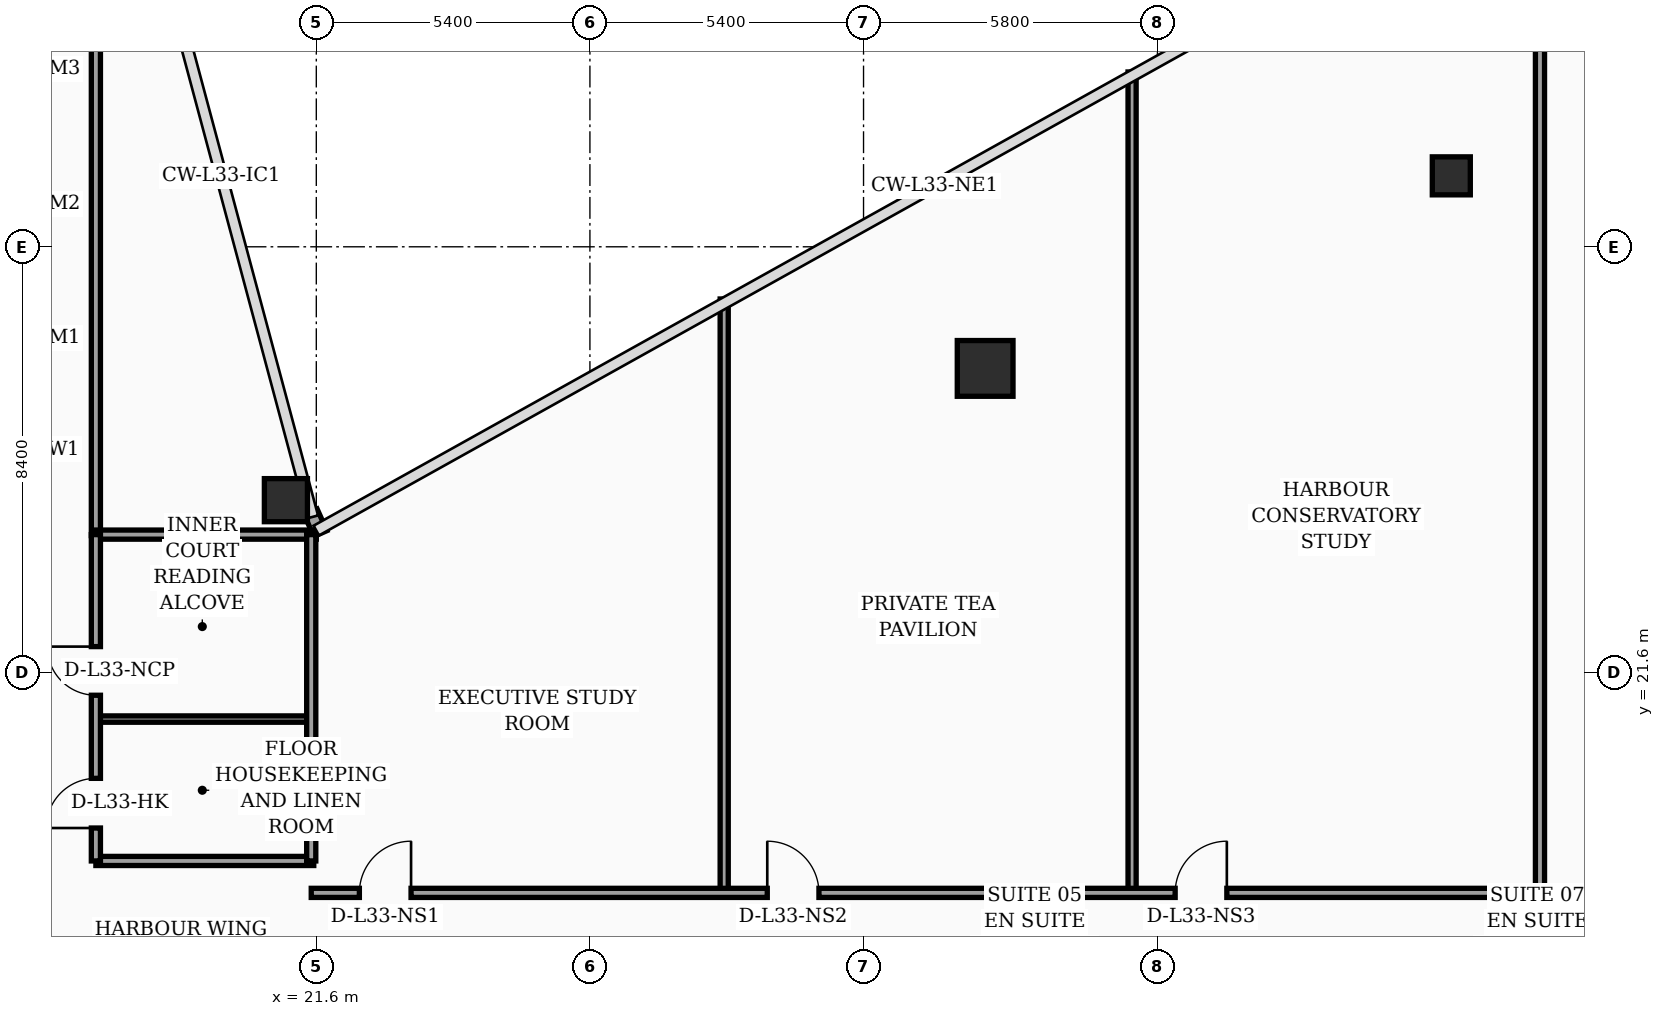
"""IFC4 building model, lengths in metres.
Left out: names, types, materials, properties, quantities, classifications, styles, units other than length and angle.
Written with IfcOpenShell. Run it as: python <this file> out.ifc"""

import sys

from ifc_helpers import new_model, si_unit, direction, frame, frame_2d, origin, origin_2d, place, context, subcontext, project, spatial, rectangle, hollow_rectangle, circle, extrude, element, fill, save


model = new_model("IFC4")
c1 = context("Model", 3, precision=1e-05, world=origin(), true_north=direction((0.0, 1.0)))
c2 = subcontext(c1, "Body", "Model", "MODEL_VIEW")
j1 = project(units=[si_unit("LENGTHUNIT", "METRE"), si_unit("PLANEANGLEUNIT", "RADIAN")], contexts=[c1])
p1 = place(None, origin())
s1 = spatial("IfcSite", under=j1, at=p1, CompositionType="ELEMENT")
p2 = place(p1, origin())
s2 = spatial("IfcBuilding", under=s1, at=p2, CompositionType="ELEMENT")
p3 = place(p2, frame((0.0, 0.0, 135.4)))
s3 = spatial("IfcBuildingStorey", under=s2, at=p3, CompositionType="ELEMENT", Elevation=135.4)
p4 = place(p3, frame((21.0, 25.0, 0.0), z_axis=(0.0, 0.0, 1.0), x_axis=(1.0, 0.0, 0.0)))
e1 = element("IfcColumn", 1, at=p4, inside=s3, PredefinedType="COLUMN", context=c2, shape_type="SweptSolid", body=[
    extrude(hollow_rectangle(XDim=0.85, YDim=0.85, WallThickness=0.036, at=origin_2d()), origin(), (0.0, 0.0, 1.0), 3.52),
])
p5 = place(p3, frame((34.8, 27.6, 0.0), z_axis=(0.0, 0.0, 1.0), x_axis=(1.0, 0.0, 0.0)))
e2 = element("IfcColumn", 2, at=p5, inside=s3, PredefinedType="COLUMN", context=c2, shape_type="SweptSolid", body=[
    extrude(circle(Radius=0.55, at=origin_2d()), origin(), (0.0, 0.0, 1.0), 3.52),
])
p6 = place(p3, frame((44.0, 31.4, 0.0), z_axis=(0.0, 0.0, 1.0), x_axis=(1.0, 0.0, 0.0)))
e3 = element("IfcColumn", 3, at=p6, inside=s3, PredefinedType="COLUMN", context=c2, shape_type="SweptSolid", body=[
    extrude(hollow_rectangle(XDim=0.75, YDim=0.75, WallThickness=0.032, at=origin_2d()), origin(), (0.0, 0.0, 1.0), 3.52),
])
p7 = place(p3, frame((21.68, 24.34, 0.0), z_axis=(0.0, 0.0, 1.0), x_axis=(-0.40758134973, 0.913168901875, 0.0)))
e4 = element("IfcWall", 4, at=p7, inside=s3, PredefinedType="SOLIDWALL", context=c2, shape_type="SweptSolid", body=[
    extrude(rectangle(XDim=0.471, YDim=0.28, at=frame_2d((0.235, 0.0))), origin(), (0.0, 0.0, 1.0), 3.52),
])
p8 = place(p3, frame((17.25, 24.3, 0.0), z_axis=(0.0, 0.0, 1.0), x_axis=(0.0, 1.0, 0.0)))
e5 = element("IfcWall", 5, at=p8, inside=s3, PredefinedType="PARTITIONING", context=c2, shape_type="SweptSolid", body=[
    extrude(rectangle(XDim=17.65, YDim=0.18, at=frame_2d((8.825, 0.0))), origin(), (0.0, 0.0, 1.0), 2.82),
])
p9 = place(p3, frame((17.25, 17.88, 0.0), z_axis=(0.0, 0.0, 1.0), x_axis=(1.0, 0.0, 0.0)))
e6 = element("IfcWall", 6, at=p9, inside=s3, PredefinedType="PARTITIONING", context=c2, shape_type="SweptSolid", body=[
    extrude(rectangle(XDim=4.3, YDim=0.18, at=frame_2d((2.15, 0.0))), origin(), (0.0, 0.0, 1.0), 3.52),
])
p10 = place(p3, frame((17.25, 20.68, 0.0), z_axis=(0.0, 0.0, 1.0), x_axis=(1.0, 0.0, 0.0)))
e7 = element("IfcWall", 7, at=p10, inside=s3, PredefinedType="PARTITIONING", context=c2, shape_type="SweptSolid", body=[
    extrude(rectangle(XDim=4.3, YDim=0.125, at=frame_2d((2.15, 0.0))), origin(), (0.0, 0.0, 1.0), 3.52),
])
p11 = place(p3, frame((17.25, 24.32, 0.0), z_axis=(0.0, 0.0, 1.0), x_axis=(1.0, 0.0, 0.0)))
e8 = element("IfcWall", 8, at=p11, inside=s3, PredefinedType="PARTITIONING", context=c2, shape_type="SweptSolid", body=[
    extrude(rectangle(XDim=4.35, YDim=0.18, at=frame_2d((2.175, 0.0))), origin(), (0.0, 0.0, 1.0), 3.52),
])
p12 = place(p3, frame((21.5, 17.88, 0.0), z_axis=(0.0, 0.0, 1.0), x_axis=(0.0, 1.0, 0.0)))
e9 = element("IfcWall", 9, at=p12, inside=s3, PredefinedType="PARTITIONING", context=c2, shape_type="SweptSolid", body=[
    extrude(rectangle(XDim=6.44, YDim=0.18, at=frame_2d((3.22, 0.0))), origin(), (0.0, 0.0, 1.0), 3.52),
])
p13 = place(p3, frame((17.25, 17.88, 0.0), z_axis=(0.0, 0.0, 1.0), x_axis=(0.0, 1.0, 0.0)))
e10 = element("IfcWall", 10, at=p13, inside=s3, PredefinedType="PARTITIONING", context=c2, shape_type="SweptSolid", body=[
    extrude(rectangle(XDim=6.44, YDim=0.18, at=frame_2d((3.22, 0.0))), origin(), (0.0, 0.0, 1.0), 3.52),
])
p14 = place(p13, frame((0.65, 0.0, 0.0)))
e11 = element("IfcOpeningElement", 11, at=p14, cuts=e10, PredefinedType="OPENING", context=c2, shape_type="SweptSolid", body=[
    extrude(rectangle(XDim=0.98, YDim=2.15, at=frame_2d((0.49, 1.075))), frame((0.0, 0.1, 0.0), z_axis=(0.0, -1.0, 0.0), x_axis=(1.0, 0.0, 0.0)), (0.0, 0.0, 1.0), 0.2),
])
p15 = place(p13, frame((3.27, 0.0, 0.0)))
e12 = element("IfcOpeningElement", 12, at=p15, cuts=e10, PredefinedType="OPENING", context=c2, shape_type="SweptSolid", body=[
    extrude(rectangle(XDim=0.96, YDim=2.2, at=frame_2d((0.48, 1.1))), frame((0.0, 0.1, 0.0), z_axis=(0.0, -1.0, 0.0), x_axis=(1.0, 0.0, 0.0)), (0.0, 0.0, 1.0), 0.2),
])
p16 = place(p3, frame((29.65, 17.25, 0.0), z_axis=(0.0, 0.0, 1.0), x_axis=(0.0, 1.0, 0.0)))
e13 = element("IfcWall", 13, at=p16, inside=s3, PredefinedType="PARTITIONING", context=c2, shape_type="SweptSolid", body=[
    extrude(rectangle(XDim=11.72, YDim=0.16, at=frame_2d((5.86, 0.0))), origin(), (0.0, 0.0, 1.0), 2.82),
])
p17 = place(p3, frame((37.7, 17.25, 0.0), z_axis=(0.0, 0.0, 1.0), x_axis=(0.0, 1.0, 0.0)))
e14 = element("IfcWall", 14, at=p17, inside=s3, PredefinedType="PARTITIONING", context=c2, shape_type="SweptSolid", body=[
    extrude(rectangle(XDim=16.2, YDim=0.16, at=frame_2d((8.1, 0.0))), origin(), (0.0, 0.0, 1.0), 2.82),
])
p18 = place(p3, frame((21.5, 17.25, 0.0), z_axis=(0.0, 0.0, 1.0), x_axis=(1.0, 0.0, 0.0)))
e15 = element("IfcWall", 15, at=p18, inside=s3, PredefinedType="PARTITIONING", context=c2, shape_type="SweptSolid", body=[
    extrude(rectangle(XDim=24.25, YDim=0.18, at=frame_2d((12.125, 0.0))), origin(), (0.0, 0.0, 1.0), 2.82),
])
p19 = place(p18, frame((0.95, 0.0, 0.0)))
e16 = element("IfcOpeningElement", 16, at=p19, cuts=e15, PredefinedType="OPENING", context=c2, shape_type="SweptSolid", body=[
    extrude(rectangle(XDim=1.02, YDim=2.2, at=frame_2d((0.51, 1.1))), frame((0.0, 0.1, 0.0), z_axis=(0.0, -1.0, 0.0), x_axis=(1.0, 0.0, 0.0)), (0.0, 0.0, 1.0), 0.2),
])
p20 = place(p18, frame((9.0, 0.0, 0.0)))
e17 = element("IfcOpeningElement", 17, at=p20, cuts=e15, PredefinedType="OPENING", context=c2, shape_type="SweptSolid", body=[
    extrude(rectangle(XDim=1.02, YDim=2.2, at=frame_2d((0.51, 1.1))), frame((0.0, 0.1, 0.0), z_axis=(0.0, -1.0, 0.0), x_axis=(1.0, 0.0, 0.0)), (0.0, 0.0, 1.0), 0.2),
])
p21 = place(p18, frame((17.05, 0.0, 0.0)))
e18 = element("IfcOpeningElement", 18, at=p21, cuts=e15, PredefinedType="OPENING", context=c2, shape_type="SweptSolid", body=[
    extrude(rectangle(XDim=1.02, YDim=2.2, at=frame_2d((0.51, 1.1))), frame((0.0, 0.1, 0.0), z_axis=(0.0, -1.0, 0.0), x_axis=(1.0, 0.0, 0.0)), (0.0, 0.0, 1.0), 0.2),
])
p22 = place(p3, frame((45.75, 17.25, 0.0), z_axis=(0.0, 0.0, 1.0), x_axis=(0.0, 1.0, 0.0)))
e19 = element("IfcWall", 19, at=p22, inside=s3, PredefinedType="PARTITIONING", context=c2, shape_type="SweptSolid", body=[
    extrude(rectangle(XDim=20.69, YDim=0.18, at=frame_2d((10.345, 0.0))), origin(), (0.0, 0.0, 1.0), 2.82),
])
p23 = place(p14, origin())
e20 = element("IfcDoor", 20, at=p23, inside=s3, OperationType="SINGLE_SWING_LEFT", PredefinedType="DOOR", context=c2, shape_type="SweptSolid", body=[
    extrude(rectangle(XDim=0.98, YDim=2.15, at=frame_2d((0.49, 1.075))), frame((0.0, 0.025, 0.0), z_axis=(0.0, -1.0, 0.0), x_axis=(1.0, 0.0, 0.0)), (0.0, 0.0, 1.0), 0.05),
])
fill(e11, e20)
p24 = place(p15, origin())
e21 = element("IfcDoor", 21, at=p24, inside=s3, OperationType="SINGLE_SWING_RIGHT", PredefinedType="DOOR", context=c2, shape_type="SweptSolid", body=[
    extrude(rectangle(XDim=0.96, YDim=2.2, at=frame_2d((0.48, 1.1))), frame((0.0, 0.025, 0.0), z_axis=(0.0, -1.0, 0.0), x_axis=(1.0, 0.0, 0.0)), (0.0, 0.0, 1.0), 0.05),
])
fill(e12, e21)
p25 = place(p19, origin())
e22 = element("IfcDoor", 22, at=p25, inside=s3, OperationType="SINGLE_SWING_RIGHT", PredefinedType="DOOR", context=c2, shape_type="SweptSolid", body=[
    extrude(rectangle(XDim=1.02, YDim=2.2, at=frame_2d((0.51, 1.1))), frame((0.0, 0.025, 0.0), z_axis=(0.0, -1.0, 0.0), x_axis=(1.0, 0.0, 0.0)), (0.0, 0.0, 1.0), 0.05),
])
fill(e16, e22)
p26 = place(p20, origin())
e23 = element("IfcDoor", 23, at=p26, inside=s3, OperationType="SINGLE_SWING_LEFT", PredefinedType="DOOR", context=c2, shape_type="SweptSolid", body=[
    extrude(rectangle(XDim=1.02, YDim=2.2, at=frame_2d((0.51, 1.1))), frame((0.0, 0.025, 0.0), z_axis=(0.0, -1.0, 0.0), x_axis=(1.0, 0.0, 0.0)), (0.0, 0.0, 1.0), 0.05),
])
fill(e17, e23)
p27 = place(p21, origin())
e24 = element("IfcDoor", 24, at=p27, inside=s3, OperationType="SINGLE_SWING_RIGHT", PredefinedType="DOOR", context=c2, shape_type="SweptSolid", body=[
    extrude(rectangle(XDim=1.02, YDim=2.2, at=frame_2d((0.51, 1.1))), frame((0.0, 0.025, 0.0), z_axis=(0.0, -1.0, 0.0), x_axis=(1.0, 0.0, 0.0)), (0.0, 0.0, 1.0), 0.05),
])
fill(e18, e24)
save(model, sys.argv[1])
